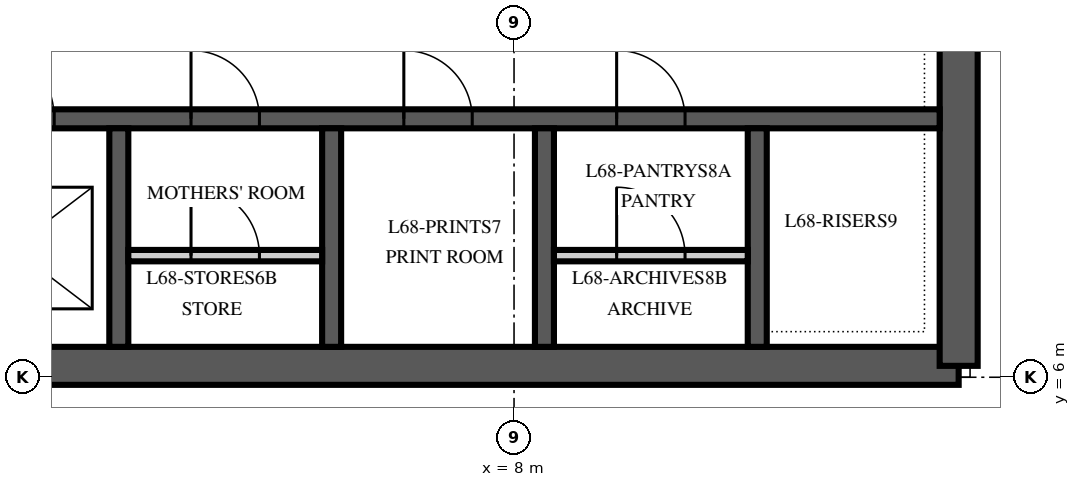
"""IFC4 building model, lengths in metres.
Left out: names, types, materials, properties, quantities, classifications, styles, units other than length and angle.
Written with IfcOpenShell. Run it as: python <this file> out.ifc"""

import sys

from ifc_helpers import new_model, si_unit, direction, frame, frame_2d, origin, place, context, subcontext, project, spatial, polyline, rectangle, outline, extrude, element, fill, save


model = new_model("IFC4")
c1 = context("Model", 3, precision=1e-05, world=origin(), true_north=direction((0.0, 1.0)))
c2 = subcontext(c1, "Body", "Model", "MODEL_VIEW")
j1 = project(units=[si_unit("LENGTHUNIT", "METRE"), si_unit("PLANEANGLEUNIT", "RADIAN")], contexts=[c1])
p1 = place(None, origin())
s1 = spatial("IfcSite", under=j1, at=p1, CompositionType="ELEMENT")
p2 = place(p1, origin())
s2 = spatial("IfcBuilding", under=s1, at=p2, CompositionType="ELEMENT")
p3 = place(p2, frame((0.0, 0.0, 292.0)))
s3 = spatial("IfcBuildingStorey", under=s2, at=p3, CompositionType="ELEMENT", Elevation=292.0)
p4 = place(p3, frame((-13.85, 6.15, 0.0), z_axis=(0.0, 0.0, 1.0), x_axis=(1.0, 0.0, 0.0)))
e1 = element("IfcWall", 1, at=p4, inside=s3, PredefinedType="SHEAR", context=c2, shape_type="SweptSolid", body=[
    extrude(rectangle(XDim=27.7, YDim=0.5, at=frame_2d((13.85, 0.0))), origin(), (0.0, 0.0, 1.0), 4.0),
])
p5 = place(p3, frame((13.85, 6.15, 0.0), z_axis=(0.0, 0.0, 1.0), x_axis=(0.0, 1.0, 0.0)))
e2 = element("IfcWall", 2, at=p5, inside=s3, PredefinedType="SHEAR", context=c2, shape_type="SweptSolid", body=[
    extrude(outline(polyline([(0.0, -0.25), (17.7, -0.25), (17.7, 0.0), (17.45, 0.0), (17.45, 0.25), (0.25, 0.25), (0.25, 0.0), (0.0, 0.0), (0.0, -0.25)])), origin(), (0.0, 0.0, 1.0), 4.0),
])
p6 = place(p5, frame((4.15, 0.0, 0.0)))
e3 = element("IfcOpeningElement", 3, at=p6, cuts=e2, PredefinedType="OPENING", context=c2, shape_type="SweptSolid", body=[
    extrude(rectangle(XDim=1.8, YDim=2.4, at=frame_2d((0.9, 1.2))), frame((0.0, 0.265, 0.0), z_axis=(0.0, -1.0, 0.0), x_axis=(1.0, 0.0, 0.0)), (0.0, 0.0, 1.0), 0.53),
])
p7 = place(p3, frame((-13.6, 9.4, 0.0), z_axis=(0.0, 0.0, 1.0), x_axis=(1.0, 0.0, 0.0)))
e4 = element("IfcWall", 4, at=p7, inside=s3, PredefinedType="SHEAR", context=c2, shape_type="SweptSolid", body=[
    extrude(rectangle(XDim=27.2, YDim=0.25, at=frame_2d((13.6, 0.0))), origin(), (0.0, 0.0, 1.0), 4.0),
])
p8 = place(p7, frame((8.85, 0.0, 0.0)))
e5 = element("IfcOpeningElement", 5, at=p8, cuts=e4, PredefinedType="OPENING", context=c2, shape_type="SweptSolid", body=[
    extrude(rectangle(XDim=1.1, YDim=2.1, at=frame_2d((0.55, 1.05))), frame((0.0, 0.14, 0.0), z_axis=(0.0, -1.0, 0.0), x_axis=(1.0, 0.0, 0.0)), (0.0, 0.0, 1.0), 0.28),
])
p9 = place(p7, frame((11.65, 0.0, 0.0)))
e6 = element("IfcOpeningElement", 6, at=p9, cuts=e4, PredefinedType="OPENING", context=c2, shape_type="SweptSolid", body=[
    extrude(rectangle(XDim=1.1, YDim=2.1, at=frame_2d((0.55, 1.05))), frame((0.0, 0.14, 0.0), z_axis=(0.0, -1.0, 0.0), x_axis=(1.0, 0.0, 0.0)), (0.0, 0.0, 1.0), 0.28),
])
p10 = place(p7, frame((14.45, 0.0, 0.0)))
e7 = element("IfcOpeningElement", 7, at=p10, cuts=e4, PredefinedType="OPENING", context=c2, shape_type="SweptSolid", body=[
    extrude(rectangle(XDim=1.1, YDim=2.1, at=frame_2d((0.55, 1.05))), frame((0.0, 0.14, 0.0), z_axis=(0.0, -1.0, 0.0), x_axis=(1.0, 0.0, 0.0)), (0.0, 0.0, 1.0), 0.28),
])
p11 = place(p7, frame((0.55, 0.0, 0.0)))
e8 = element("IfcOpeningElement", 8, at=p11, cuts=e4, PredefinedType="OPENING", context=c2, shape_type="SweptSolid", body=[
    extrude(rectangle(XDim=0.9, YDim=2.1, at=frame_2d((0.45, 1.05))), frame((0.0, 0.14, 0.0), z_axis=(0.0, -1.0, 0.0), x_axis=(1.0, 0.0, 0.0)), (0.0, 0.0, 1.0), 0.28),
])
p12 = place(p7, frame((3.35, 0.0, 0.0)))
e9 = element("IfcOpeningElement", 9, at=p12, cuts=e4, PredefinedType="OPENING", context=c2, shape_type="SweptSolid", body=[
    extrude(rectangle(XDim=0.9, YDim=2.1, at=frame_2d((0.45, 1.05))), frame((0.0, 0.14, 0.0), z_axis=(0.0, -1.0, 0.0), x_axis=(1.0, 0.0, 0.0)), (0.0, 0.0, 1.0), 0.28),
])
p13 = place(p7, frame((6.15, 0.0, 0.0)))
e10 = element("IfcOpeningElement", 10, at=p13, cuts=e4, PredefinedType="OPENING", context=c2, shape_type="SweptSolid", body=[
    extrude(rectangle(XDim=0.9, YDim=2.1, at=frame_2d((0.45, 1.05))), frame((0.0, 0.14, 0.0), z_axis=(0.0, -1.0, 0.0), x_axis=(1.0, 0.0, 0.0)), (0.0, 0.0, 1.0), 0.28),
])
p14 = place(p7, frame((17.35, 0.0, 0.0)))
e11 = element("IfcOpeningElement", 11, at=p14, cuts=e4, PredefinedType="OPENING", context=c2, shape_type="SweptSolid", body=[
    extrude(rectangle(XDim=0.9, YDim=2.1, at=frame_2d((0.45, 1.05))), frame((0.0, 0.14, 0.0), z_axis=(0.0, -1.0, 0.0), x_axis=(1.0, 0.0, 0.0)), (0.0, 0.0, 1.0), 0.28),
])
p15 = place(p7, frame((20.15, 0.0, 0.0)))
e12 = element("IfcOpeningElement", 12, at=p15, cuts=e4, PredefinedType="OPENING", context=c2, shape_type="SweptSolid", body=[
    extrude(rectangle(XDim=0.9, YDim=2.1, at=frame_2d((0.45, 1.05))), frame((0.0, 0.14, 0.0), z_axis=(0.0, -1.0, 0.0), x_axis=(1.0, 0.0, 0.0)), (0.0, 0.0, 1.0), 0.28),
])
p16 = place(p7, frame((22.95, 0.0, 0.0)))
e13 = element("IfcOpeningElement", 13, at=p16, cuts=e4, PredefinedType="OPENING", context=c2, shape_type="SweptSolid", body=[
    extrude(rectangle(XDim=0.9, YDim=2.1, at=frame_2d((0.45, 1.05))), frame((0.0, 0.14, 0.0), z_axis=(0.0, -1.0, 0.0), x_axis=(1.0, 0.0, 0.0)), (0.0, 0.0, 1.0), 0.28),
])
for number, where, z_axis, x_axis in (
    (14, (2.8, 6.4, 0.0), (0.0, 0.0, 1.0), (0.0, 1.0, 0.0)),
    (15, (5.6, 6.4, 0.0), (0.0, 0.0, 1.0), (0.0, 1.0, 0.0)),
    (16, (8.4, 6.4, 0.0), (0.0, 0.0, 1.0), (0.0, 1.0, 0.0)),
    (17, (11.2, 6.4, 0.0), (0.0, 0.0, 1.0), (0.0, 1.0, 0.0)),
):
    element("IfcWall", number, at=place(p3, frame(where, z_axis=z_axis, x_axis=x_axis)), inside=s3, PredefinedType="SHEAR", context=c2, shape_type="SweptSolid", body=[
        extrude(rectangle(XDim=2.875, YDim=0.25, at=frame_2d((1.438, 0.0))), origin(), (0.0, 0.0, 1.0), 4.0),
    ])
p17 = place(p3, frame((2.925, 7.6, 0.0), z_axis=(0.0, 0.0, 1.0), x_axis=(1.0, 0.0, 0.0)))
e18 = element("IfcWall", 18, at=p17, inside=s3, PredefinedType="PARTITIONING", context=c2, shape_type="SweptSolid", body=[
    extrude(rectangle(XDim=2.55, YDim=0.15, at=frame_2d((1.275, 0.0))), origin(), (0.0, 0.0, 1.0), 3.85),
])
p18 = place(p17, frame((0.825, 0.0, 0.0)))
e19 = element("IfcOpeningElement", 19, at=p18, cuts=e18, PredefinedType="OPENING", context=c2, shape_type="SweptSolid", body=[
    extrude(rectangle(XDim=0.9, YDim=2.1, at=frame_2d((0.45, 1.05))), frame((0.0, 0.09, 0.0), z_axis=(0.0, -1.0, 0.0), x_axis=(1.0, 0.0, 0.0)), (0.0, 0.0, 1.0), 0.18),
])
p19 = place(p3, frame((8.525, 7.6, 0.0), z_axis=(0.0, 0.0, 1.0), x_axis=(1.0, 0.0, 0.0)))
e20 = element("IfcWall", 20, at=p19, inside=s3, PredefinedType="PARTITIONING", context=c2, shape_type="SweptSolid", body=[
    extrude(rectangle(XDim=2.55, YDim=0.15, at=frame_2d((1.275, 0.0))), origin(), (0.0, 0.0, 1.0), 3.85),
])
p20 = place(p19, frame((0.825, 0.0, 0.0)))
e21 = element("IfcOpeningElement", 21, at=p20, cuts=e20, PredefinedType="OPENING", context=c2, shape_type="SweptSolid", body=[
    extrude(rectangle(XDim=0.9, YDim=2.1, at=frame_2d((0.45, 1.05))), frame((0.0, 0.09, 0.0), z_axis=(0.0, -1.0, 0.0), x_axis=(1.0, 0.0, 0.0)), (0.0, 0.0, 1.0), 0.18),
])
p21 = place(p10, origin())
e22 = element("IfcDoor", 22, at=p21, inside=s3, OperationType="SLIDING_TO_LEFT", PredefinedType="DOOR", context=c2, shape_type="SweptSolid", body=[
    extrude(rectangle(XDim=1.1, YDim=2.1, at=frame_2d((0.55, 1.05))), frame((0.0, 0.125, 0.0), z_axis=(0.0, -1.0, 0.0), x_axis=(1.0, 0.0, 0.0)), (0.0, 0.0, 1.0), 0.25),
])
fill(e7, e22)
p22 = place(p14, origin())
e23 = element("IfcDoor", 23, at=p22, inside=s3, OperationType="SINGLE_SWING_LEFT", PredefinedType="DOOR", context=c2, shape_type="SweptSolid", body=[
    extrude(rectangle(XDim=0.9, YDim=2.1, at=frame_2d((0.45, 1.05))), frame((0.0, 0.125, 0.0), z_axis=(0.0, -1.0, 0.0), x_axis=(1.0, 0.0, 0.0)), (0.0, 0.0, 1.0), 0.25),
])
fill(e11, e23)
p23 = place(p18, origin())
e24 = element("IfcDoor", 24, at=p23, inside=s3, OperationType="SINGLE_SWING_LEFT", PredefinedType="DOOR", context=c2, shape_type="SweptSolid", body=[
    extrude(rectangle(XDim=0.9, YDim=2.1, at=frame_2d((0.45, 1.05))), frame((0.0, 0.075, 0.0), z_axis=(0.0, -1.0, 0.0), x_axis=(1.0, 0.0, 0.0)), (0.0, 0.0, 1.0), 0.149),
])
fill(e19, e24)
p24 = place(p15, origin())
e25 = element("IfcDoor", 25, at=p24, inside=s3, OperationType="SINGLE_SWING_LEFT", PredefinedType="DOOR", context=c2, shape_type="SweptSolid", body=[
    extrude(rectangle(XDim=0.9, YDim=2.1, at=frame_2d((0.45, 1.05))), frame((0.0, 0.125, 0.0), z_axis=(0.0, -1.0, 0.0), x_axis=(1.0, 0.0, 0.0)), (0.0, 0.0, 1.0), 0.25),
])
fill(e12, e25)
p25 = place(p16, origin())
e26 = element("IfcDoor", 26, at=p25, inside=s3, OperationType="SINGLE_SWING_LEFT", PredefinedType="DOOR", context=c2, shape_type="SweptSolid", body=[
    extrude(rectangle(XDim=0.9, YDim=2.1, at=frame_2d((0.45, 1.05))), frame((0.0, 0.125, 0.0), z_axis=(0.0, -1.0, 0.0), x_axis=(1.0, 0.0, 0.0)), (0.0, 0.0, 1.0), 0.25),
])
fill(e13, e26)
p26 = place(p20, origin())
e27 = element("IfcDoor", 27, at=p26, inside=s3, OperationType="SINGLE_SWING_LEFT", PredefinedType="DOOR", context=c2, shape_type="SweptSolid", body=[
    extrude(rectangle(XDim=0.9, YDim=2.1, at=frame_2d((0.45, 1.05))), frame((0.0, 0.075, 0.0), z_axis=(0.0, -1.0, 0.0), x_axis=(1.0, 0.0, 0.0)), (0.0, 0.0, 1.0), 0.149),
])
fill(e21, e27)
save(model, sys.argv[1])
